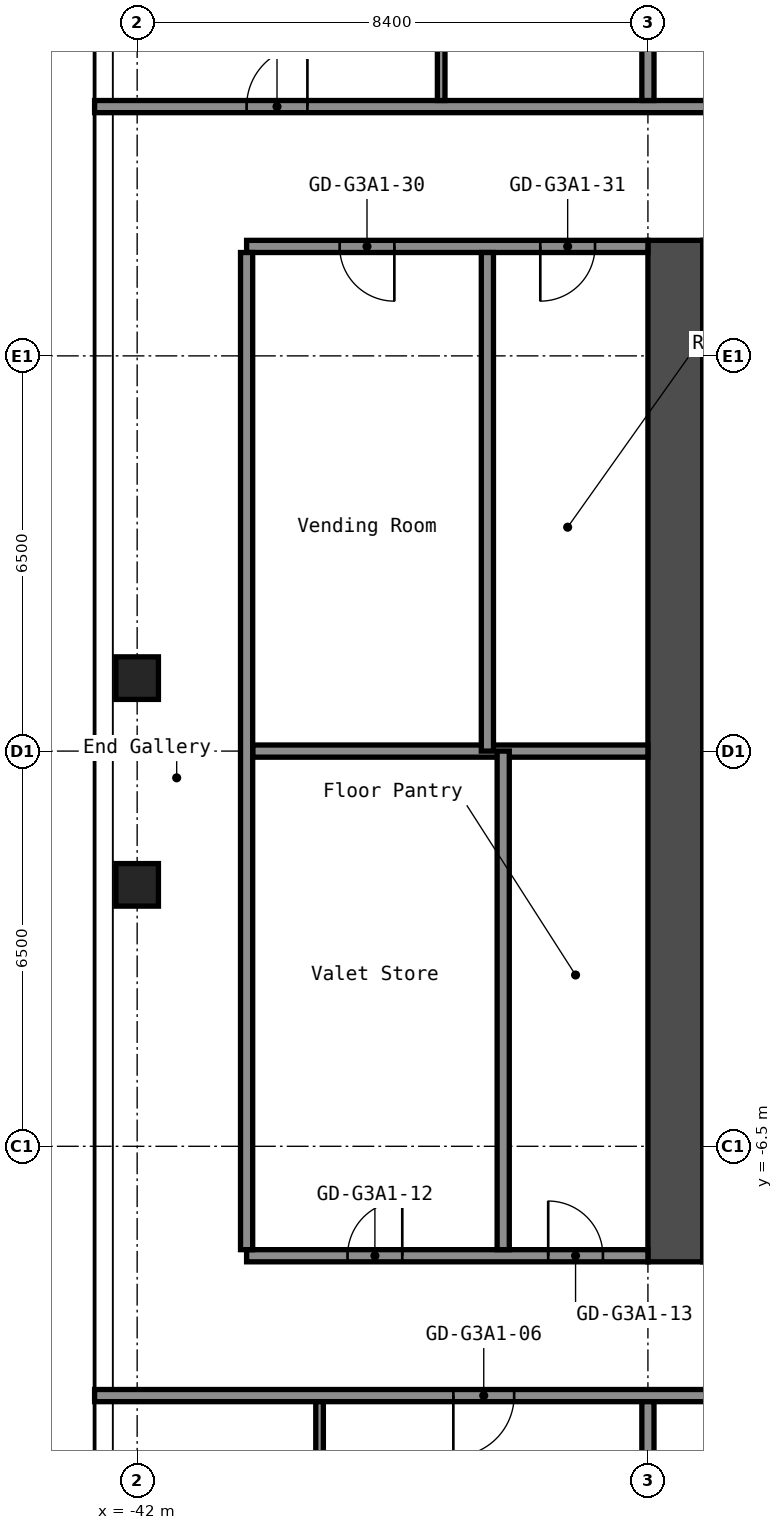
"""IFC4 building model, lengths in metres.
Left out: names, types, materials, properties, quantities, classifications, styles, units other than length and angle.
Written with IfcOpenShell. Run it as: python <this file> out.ifc"""

import sys

from ifc_helpers import new_model, si_unit, direction, frame, frame_2d, origin, origin_2d, place, context, subcontext, project, spatial, rectangle, hollow_rectangle, extrude, element, fill, save


model = new_model("IFC4")
c1 = context("Model", 3, precision=1e-05, world=origin(), true_north=direction((0.0, 1.0)))
c2 = subcontext(c1, "Body", "Model", "MODEL_VIEW")
j1 = project(units=[si_unit("LENGTHUNIT", "METRE"), si_unit("PLANEANGLEUNIT", "RADIAN")], contexts=[c1])
p1 = place(None, origin())
s1 = spatial("IfcSite", under=j1, at=p1, CompositionType="ELEMENT")
p2 = place(p1, origin())
s2 = spatial("IfcBuilding", under=s1, at=p2, CompositionType="ELEMENT")
p3 = place(p2, frame((0.0, 0.0, 147.0)))
s3 = spatial("IfcBuildingStorey", under=s2, at=p3, CompositionType="ELEMENT", Elevation=147.0)
for number, where, z_axis, x_axis in (
    (1, (-42.0, -2.2, 0.0), (0.0, 0.0, 1.0), (1.0, 0.0, 0.0)),
    (2, (-42.0, 1.2, 0.0), (0.0, 0.0, 1.0), (1.0, 0.0, 0.0)),
):
    element("IfcColumn", number, at=place(p3, frame(where, z_axis=z_axis, x_axis=x_axis)), inside=s3, PredefinedType="COLUMN", context=c2, shape_type="SweptSolid", body=[
        extrude(hollow_rectangle(XDim=0.7, YDim=0.7, WallThickness=0.028, at=origin_2d()), origin(), (0.0, 0.0, 1.0), 2.75),
    ])
p4 = place(p3, frame((-33.15, -8.4, 0.0), z_axis=(0.0, 0.0, 1.0), x_axis=(0.0, 1.0, 0.0)))
e3 = element("IfcWall", 3, at=p4, inside=s3, PredefinedType="SHEAR", context=c2, shape_type="SweptSolid", body=[
    extrude(rectangle(XDim=16.8, YDim=0.9, at=frame_2d((8.4, 0.0))), origin(), (0.0, 0.0, 1.0), 2.75),
])
p5 = place(p3, frame((-32.7, 1.325, 0.0), z_axis=(0.0, 0.0, 1.0), x_axis=(1.0, 0.0, 0.0)))
e4 = element("IfcWall", 4, at=p5, inside=s3, PredefinedType="SHEAR", context=c2, shape_type="SweptSolid", body=[
    extrude(rectangle(XDim=5.05, YDim=0.25, at=frame_2d((2.525, 0.0))), origin(), (0.0, 0.0, 1.0), 2.75),
])
p6 = place(p5, frame((3.3, 0.0, 0.0)))
e5 = element("IfcOpeningElement", 5, at=p6, cuts=e4, PredefinedType="OPENING", context=c2, shape_type="SweptSolid", body=[
    extrude(rectangle(XDim=1.2, YDim=2.1, at=frame_2d((0.6, 1.05))), frame((0.0, 0.135, 0.0), z_axis=(0.0, -1.0, 0.0), x_axis=(1.0, 0.0, 0.0)), (0.0, 0.0, 1.0), 0.27),
])
p7 = place(p3, frame((-32.7, -3.625, 0.0), z_axis=(0.0, 0.0, 1.0), x_axis=(1.0, 0.0, 0.0)))
e6 = element("IfcWall", 6, at=p7, inside=s3, PredefinedType="SHEAR", context=c2, shape_type="SweptSolid", body=[
    extrude(rectangle(XDim=4.55, YDim=0.25, at=frame_2d((2.275, 0.0))), origin(), (0.0, 0.0, 1.0), 2.75),
])
p8 = place(p7, frame((2.85, 0.0, 0.0)))
e7 = element("IfcOpeningElement", 7, at=p8, cuts=e6, PredefinedType="OPENING", context=c2, shape_type="SweptSolid", body=[
    extrude(rectangle(XDim=1.1, YDim=2.1, at=frame_2d((0.55, 1.05))), frame((0.0, 0.135, 0.0), z_axis=(0.0, -1.0, 0.0), x_axis=(1.0, 0.0, 0.0)), (0.0, 0.0, 1.0), 0.27),
])
p9 = place(p7, frame((0.6, 0.0, 0.0)))
e8 = element("IfcOpeningElement", 8, at=p9, cuts=e6, PredefinedType="OPENING", context=c2, shape_type="SweptSolid", body=[
    extrude(rectangle(XDim=1.1, YDim=2.1, at=frame_2d((0.55, 1.05))), frame((0.0, 0.135, 0.0), z_axis=(0.0, -1.0, 0.0), x_axis=(1.0, 0.0, 0.0)), (0.0, 0.0, 1.0), 0.27),
])
p10 = place(p3, frame((-32.7, -6.75, 0.0), z_axis=(0.0, 0.0, 1.0), x_axis=(1.0, 0.0, 0.0)))
e9 = element("IfcWall", 9, at=p10, inside=s3, PredefinedType="SHEAR", context=c2, shape_type="SweptSolid", body=[
    extrude(rectangle(XDim=4.55, YDim=1.5, at=frame_2d((2.275, 0.0))), origin(), (0.0, 0.0, 1.0), 2.75),
])
p11 = place(p3, frame((-32.7, -1.075, 0.0), z_axis=(0.0, 0.0, 1.0), x_axis=(1.0, 0.0, 0.0)))
e10 = element("IfcWall", 10, at=p11, inside=s3, PredefinedType="PARTITIONING", context=c2, shape_type="SweptSolid", body=[
    extrude(rectangle(XDim=1.6, YDim=0.15, at=frame_2d((0.8, 0.0))), origin(), (0.0, 0.0, 1.0), 2.75),
])
p12 = place(p3, frame((-42.7, -10.6, 0.0), z_axis=(0.0, 0.0, 1.0), x_axis=(1.0, 0.0, 0.0)))
e11 = element("IfcWall", 11, at=p12, inside=s3, PredefinedType="PARTITIONING", context=c2, shape_type="SweptSolid", body=[
    extrude(rectangle(XDim=25.9, YDim=0.2, at=frame_2d((12.95, 0.0))), origin(), (0.0, 0.0, 1.0), 2.75),
])
p13 = place(p12, frame((5.9, 0.0, 0.0)))
e12 = element("IfcOpeningElement", 12, at=p13, cuts=e11, PredefinedType="OPENING", context=c2, shape_type="SweptSolid", body=[
    extrude(rectangle(XDim=1.0, YDim=2.1, at=frame_2d((0.5, 1.05))), frame((0.0, 0.11, 0.0), z_axis=(0.0, -1.0, 0.0), x_axis=(1.0, 0.0, 0.0)), (0.0, 0.0, 1.0), 0.22),
])
p14 = place(p12, frame((14.5, 0.0, 0.0)))
e13 = element("IfcOpeningElement", 13, at=p14, cuts=e11, PredefinedType="OPENING", context=c2, shape_type="SweptSolid", body=[
    extrude(rectangle(XDim=1.0, YDim=2.1, at=frame_2d((0.5, 1.05))), frame((0.0, 0.11, 0.0), z_axis=(0.0, -1.0, 0.0), x_axis=(1.0, 0.0, 0.0)), (0.0, 0.0, 1.0), 0.22),
])
p15 = place(p12, frame((23.0, 0.0, 0.0)))
e14 = element("IfcOpeningElement", 14, at=p15, cuts=e11, PredefinedType="OPENING", context=c2, shape_type="SweptSolid", body=[
    extrude(rectangle(XDim=1.0, YDim=2.1, at=frame_2d((0.5, 1.05))), frame((0.0, 0.11, 0.0), z_axis=(0.0, -1.0, 0.0), x_axis=(1.0, 0.0, 0.0)), (0.0, 0.0, 1.0), 0.22),
])
p16 = place(p3, frame((-40.2, -8.3, 0.0), z_axis=(0.0, 0.0, 1.0), x_axis=(1.0, 0.0, 0.0)))
e15 = element("IfcWall", 15, at=p16, inside=s3, PredefinedType="PARTITIONING", context=c2, shape_type="SweptSolid", body=[
    extrude(rectangle(XDim=6.6, YDim=0.2, at=frame_2d((3.3, 0.0))), origin(), (0.0, 0.0, 1.0), 2.75),
])
p17 = place(p16, frame((1.66, 0.0, 0.0)))
e16 = element("IfcOpeningElement", 16, at=p17, cuts=e15, PredefinedType="OPENING", context=c2, shape_type="SweptSolid", body=[
    extrude(rectangle(XDim=0.9, YDim=2.1, at=frame_2d((0.45, 1.05))), frame((0.0, 0.11, 0.0), z_axis=(0.0, -1.0, 0.0), x_axis=(1.0, 0.0, 0.0)), (0.0, 0.0, 1.0), 0.22),
])
p18 = place(p16, frame((4.96, 0.0, 0.0)))
e17 = element("IfcOpeningElement", 17, at=p18, cuts=e15, PredefinedType="OPENING", context=c2, shape_type="SweptSolid", body=[
    extrude(rectangle(XDim=0.9, YDim=2.1, at=frame_2d((0.45, 1.05))), frame((0.0, 0.11, 0.0), z_axis=(0.0, -1.0, 0.0), x_axis=(1.0, 0.0, 0.0)), (0.0, 0.0, 1.0), 0.22),
])
p19 = place(p3, frame((-40.1, 0.0, 0.0), z_axis=(0.0, 0.0, 1.0), x_axis=(1.0, 0.0, 0.0)))
e18 = element("IfcWall", 18, at=p19, inside=s3, PredefinedType="PARTITIONING", context=c2, shape_type="SweptSolid", body=[
    extrude(rectangle(XDim=6.5, YDim=0.2, at=frame_2d((3.25, 0.0))), origin(), (0.0, 0.0, 1.0), 2.75),
])
p20 = place(p3, frame((-40.2, 8.3, 0.0), z_axis=(0.0, 0.0, 1.0), x_axis=(1.0, 0.0, 0.0)))
e19 = element("IfcWall", 19, at=p20, inside=s3, PredefinedType="PARTITIONING", context=c2, shape_type="SweptSolid", body=[
    extrude(rectangle(XDim=6.6, YDim=0.2, at=frame_2d((3.3, 0.0))), origin(), (0.0, 0.0, 1.0), 2.75),
])
p21 = place(p20, frame((1.53, 0.0, 0.0)))
e20 = element("IfcOpeningElement", 20, at=p21, cuts=e19, PredefinedType="OPENING", context=c2, shape_type="SweptSolid", body=[
    extrude(rectangle(XDim=0.9, YDim=2.1, at=frame_2d((0.45, 1.05))), frame((0.0, 0.11, 0.0), z_axis=(0.0, -1.0, 0.0), x_axis=(1.0, 0.0, 0.0)), (0.0, 0.0, 1.0), 0.22),
])
p22 = place(p20, frame((4.83, 0.0, 0.0)))
e21 = element("IfcOpeningElement", 21, at=p22, cuts=e19, PredefinedType="OPENING", context=c2, shape_type="SweptSolid", body=[
    extrude(rectangle(XDim=0.9, YDim=2.1, at=frame_2d((0.45, 1.05))), frame((0.0, 0.11, 0.0), z_axis=(0.0, -1.0, 0.0), x_axis=(1.0, 0.0, 0.0)), (0.0, 0.0, 1.0), 0.22),
])
p23 = place(p3, frame((-42.7, 10.6, 0.0), z_axis=(0.0, 0.0, 1.0), x_axis=(1.0, 0.0, 0.0)))
e22 = element("IfcWall", 22, at=p23, inside=s3, PredefinedType="PARTITIONING", context=c2, shape_type="SweptSolid", body=[
    extrude(rectangle(XDim=25.9, YDim=0.2, at=frame_2d((12.95, 0.0))), origin(), (0.0, 0.0, 1.0), 2.75),
])
p24 = place(p23, frame((2.5, 0.0, 0.0)))
e23 = element("IfcOpeningElement", 23, at=p24, cuts=e22, PredefinedType="OPENING", context=c2, shape_type="SweptSolid", body=[
    extrude(rectangle(XDim=1.0, YDim=2.1, at=frame_2d((0.5, 1.05))), frame((0.0, 0.11, 0.0), z_axis=(0.0, -1.0, 0.0), x_axis=(1.0, 0.0, 0.0)), (0.0, 0.0, 1.0), 0.22),
])
p25 = place(p23, frame((11.1, 0.0, 0.0)))
e24 = element("IfcOpeningElement", 24, at=p25, cuts=e22, PredefinedType="OPENING", context=c2, shape_type="SweptSolid", body=[
    extrude(rectangle(XDim=1.0, YDim=2.1, at=frame_2d((0.5, 1.05))), frame((0.0, 0.11, 0.0), z_axis=(0.0, -1.0, 0.0), x_axis=(1.0, 0.0, 0.0)), (0.0, 0.0, 1.0), 0.22),
])
p26 = place(p23, frame((19.5, 0.0, 0.0)))
e25 = element("IfcOpeningElement", 25, at=p26, cuts=e22, PredefinedType="OPENING", context=c2, shape_type="SweptSolid", body=[
    extrude(rectangle(XDim=1.0, YDim=2.1, at=frame_2d((0.5, 1.05))), frame((0.0, 0.11, 0.0), z_axis=(0.0, -1.0, 0.0), x_axis=(1.0, 0.0, 0.0)), (0.0, 0.0, 1.0), 0.22),
])
p27 = place(p3, frame((-40.2, -8.2, 0.0), z_axis=(0.0, 0.0, 1.0), x_axis=(0.0, 1.0, 0.0)))
e26 = element("IfcWall", 26, at=p27, inside=s3, PredefinedType="PARTITIONING", context=c2, shape_type="SweptSolid", body=[
    extrude(rectangle(XDim=16.4, YDim=0.2, at=frame_2d((8.2, 0.0))), origin(), (0.0, 0.0, 1.0), 2.75),
])
for number, where, z_axis, x_axis in (
    (27, (-39.0, -14.0, 0.0), (0.0, 0.0, 1.0), (0.0, 1.0, 0.0)),
    (28, (-37.0, 10.7, 0.0), (0.0, 0.0, 1.0), (0.0, 1.0, 0.0)),
):
    element("IfcWall", number, at=place(p3, frame(where, z_axis=z_axis, x_axis=x_axis)), inside=s3, PredefinedType="PARTITIONING", context=c2, shape_type="SweptSolid", body=[
        extrude(rectangle(XDim=3.3, YDim=0.125, at=frame_2d((1.65, 0.0))), origin(), (0.0, 0.0, 1.0), 2.75),
    ])
for number, where, z_axis, x_axis in (
    (29, (-36.24, 0.0, 0.0), (0.0, 0.0, 1.0), (0.0, 1.0, 0.0)),
    (30, (-35.98, -8.2, 0.0), (0.0, 0.0, 1.0), (0.0, 1.0, 0.0)),
):
    element("IfcWall", number, at=place(p3, frame(where, z_axis=z_axis, x_axis=x_axis)), inside=s3, PredefinedType="PARTITIONING", context=c2, shape_type="SweptSolid", body=[
        extrude(rectangle(XDim=8.2, YDim=0.2, at=frame_2d((4.1, 0.0))), origin(), (0.0, 0.0, 1.0), 2.75),
    ])
p28 = place(p3, frame((-33.6, -19.3, 0.0), z_axis=(0.0, 0.0, 1.0), x_axis=(0.0, 1.0, 0.0)))
e31 = element("IfcWall", 31, at=p28, inside=s3, PredefinedType="PARTITIONING", context=c2, shape_type="SweptSolid", body=[
    extrude(rectangle(XDim=8.6, YDim=0.2, at=frame_2d((4.3, 0.0))), origin(), (0.0, 0.0, 1.0), 2.75),
])
p29 = place(p3, frame((-33.6, 10.7, 0.0), z_axis=(0.0, 0.0, 1.0), x_axis=(0.0, 1.0, 0.0)))
e32 = element("IfcWall", 32, at=p29, inside=s3, PredefinedType="PARTITIONING", context=c2, shape_type="SweptSolid", body=[
    extrude(rectangle(XDim=7.6, YDim=0.2, at=frame_2d((3.8, 0.0))), origin(), (0.0, 0.0, 1.0), 2.75),
])
p30 = place(p13, origin())
e33 = element("IfcDoor", 33, at=p30, inside=s3, OperationType="SINGLE_SWING_LEFT", PredefinedType="DOOR", context=c2, shape_type="SweptSolid", body=[
    extrude(rectangle(XDim=1.0, YDim=2.1, at=frame_2d((0.5, 1.05))), frame((0.0, 0.025, 0.0), z_axis=(0.0, -1.0, 0.0), x_axis=(1.0, 0.0, 0.0)), (0.0, 0.0, 1.0), 0.05),
])
fill(e12, e33)
p31 = place(p17, origin())
e34 = element("IfcDoor", 34, at=p31, inside=s3, OperationType="SINGLE_SWING_LEFT", PredefinedType="DOOR", context=c2, shape_type="SweptSolid", body=[
    extrude(rectangle(XDim=0.9, YDim=2.1, at=frame_2d((0.45, 1.05))), frame((0.0, 0.025, 0.0), z_axis=(0.0, -1.0, 0.0), x_axis=(1.0, 0.0, 0.0)), (0.0, 0.0, 1.0), 0.05),
])
fill(e16, e34)
p32 = place(p18, origin())
e35 = element("IfcDoor", 35, at=p32, inside=s3, OperationType="SINGLE_SWING_RIGHT", PredefinedType="DOOR", context=c2, shape_type="SweptSolid", body=[
    extrude(rectangle(XDim=0.9, YDim=2.1, at=frame_2d((0.45, 1.05))), frame((0.0, 0.025, 0.0), z_axis=(0.0, -1.0, 0.0), x_axis=(1.0, 0.0, 0.0)), (0.0, 0.0, 1.0), 0.05),
])
fill(e17, e35)
p33 = place(p21, origin())
e36 = element("IfcDoor", 36, at=p33, inside=s3, OperationType="SINGLE_SWING_RIGHT", PredefinedType="DOOR", context=c2, shape_type="SweptSolid", body=[
    extrude(rectangle(XDim=0.9, YDim=2.1, at=frame_2d((0.45, 1.05))), frame((0.0, 0.025, 0.0), z_axis=(0.0, -1.0, 0.0), x_axis=(1.0, 0.0, 0.0)), (0.0, 0.0, 1.0), 0.05),
])
fill(e20, e36)
p34 = place(p22, origin())
e37 = element("IfcDoor", 37, at=p34, inside=s3, OperationType="SINGLE_SWING_LEFT", PredefinedType="DOOR", context=c2, shape_type="SweptSolid", body=[
    extrude(rectangle(XDim=0.9, YDim=2.1, at=frame_2d((0.45, 1.05))), frame((0.0, 0.025, 0.0), z_axis=(0.0, -1.0, 0.0), x_axis=(1.0, 0.0, 0.0)), (0.0, 0.0, 1.0), 0.05),
])
fill(e21, e37)
p35 = place(p24, origin())
e38 = element("IfcDoor", 38, at=p35, inside=s3, OperationType="SINGLE_SWING_LEFT", PredefinedType="DOOR", context=c2, shape_type="SweptSolid", body=[
    extrude(rectangle(XDim=1.0, YDim=2.1, at=frame_2d((0.5, 1.05))), frame((0.0, 0.025, 0.0), z_axis=(0.0, -1.0, 0.0), x_axis=(1.0, 0.0, 0.0)), (0.0, 0.0, 1.0), 0.05),
])
fill(e23, e38)
save(model, sys.argv[1])
